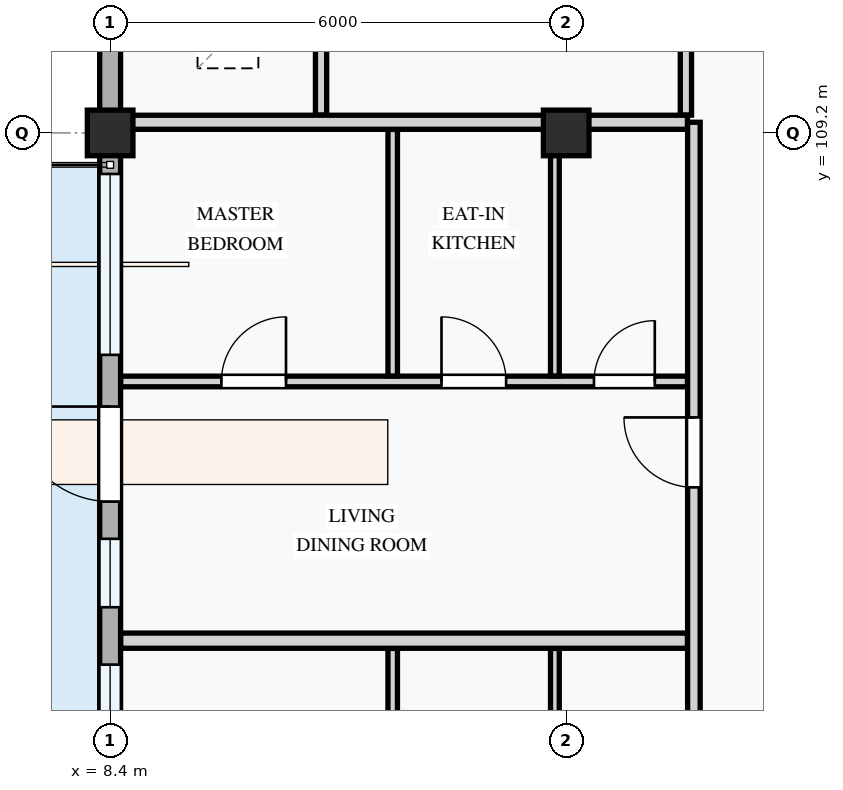
"""IFC4 building model, lengths in metres.
Left out: names, types, materials, properties, quantities, classifications, styles, units other than length and angle.
Written with IfcOpenShell. Run it as: python <this file> out.ifc"""

import sys

from ifc_helpers import new_model, si_unit, direction, frame, frame_2d, origin, origin_2d, place, context, subcontext, project, spatial, rectangle, extrude, element, fill, save


model = new_model("IFC4")
c1 = context("Model", 3, precision=1e-05, world=origin(), true_north=direction((0.0, 1.0)))
c2 = subcontext(c1, "Body", "Model", "MODEL_VIEW")
j1 = project(units=[si_unit("LENGTHUNIT", "METRE"), si_unit("PLANEANGLEUNIT", "RADIAN")], contexts=[c1])
p1 = place(None, origin())
s1 = spatial("IfcSite", under=j1, at=p1, CompositionType="ELEMENT")
p2 = place(p1, origin())
s2 = spatial("IfcBuilding", under=s1, at=p2, CompositionType="ELEMENT")
p3 = place(p2, frame((0.0, 0.0, 31.2)))
s3 = spatial("IfcBuildingStorey", under=s2, at=p3, CompositionType="ELEMENT", Elevation=31.2)
for number, where, z_axis, x_axis in (
    (1, (8.4, 109.2, 0.0), (0.0, 0.0, 1.0), (1.0, 0.0, 0.0)),
    (2, (14.4, 109.2, 0.0), (0.0, 0.0, 1.0), (1.0, 0.0, 0.0)),
):
    element("IfcColumn", number, at=place(p3, frame(where, z_axis=z_axis, x_axis=x_axis)), inside=s3, PredefinedType="COLUMN", context=c2, shape_type="SweptSolid", body=[
        extrude(rectangle(XDim=0.6, YDim=0.6, at=origin_2d()), origin(), (0.0, 0.0, 1.0), 3.3),
    ])
p4 = place(p3, frame((8.4, 115.2, 0.0), z_axis=(0.0, 0.0, 1.0), x_axis=(0.0, -1.0, 0.0)))
e3 = element("IfcWall", 3, at=p4, inside=s3, PredefinedType="STANDARD", context=c2, shape_type="SweptSolid", body=[
    extrude(rectangle(XDim=6.0, YDim=0.275, at=frame_2d((3.0, 0.0))), origin(), (0.0, 0.0, 1.0), 2.575),
])
p5 = place(p4, frame((0.545, 0.0, 0.78)))
e4 = element("IfcOpeningElement", 4, at=p5, cuts=e3, PredefinedType="OPENING", context=c2, shape_type="SweptSolid", body=[
    extrude(rectangle(XDim=0.9, YDim=1.2, at=frame_2d((0.45, 0.6))), frame((0.0, 0.147, 0.0), z_axis=(0.0, -1.0, 0.0), x_axis=(1.0, 0.0, 0.0)), (0.0, 0.0, 1.0), 0.295),
])
p6 = place(p4, frame((2.98, 0.0, 0.78)))
e5 = element("IfcOpeningElement", 5, at=p6, cuts=e3, PredefinedType="OPENING", context=c2, shape_type="SweptSolid", body=[
    extrude(rectangle(XDim=1.65, YDim=1.5, at=frame_2d((0.825, 0.75))), frame((0.0, 0.147, 0.0), z_axis=(0.0, -1.0, 0.0), x_axis=(1.0, 0.0, 0.0)), (0.0, 0.0, 1.0), 0.295),
])
p7 = place(p3, frame((8.4, 109.2, 0.0), z_axis=(0.0, 0.0, 1.0), x_axis=(0.0, -1.0, 0.0)))
e6 = element("IfcWall", 6, at=p7, inside=s3, PredefinedType="STANDARD", context=c2, shape_type="SweptSolid", body=[
    extrude(rectangle(XDim=8.4, YDim=0.275, at=frame_2d((4.2, 0.0))), origin(), (0.0, 0.0, 1.0), 2.425),
])
p8 = place(p7, frame((3.6, 0.0, 0.0)))
e7 = element("IfcOpeningElement", 7, at=p8, cuts=e6, PredefinedType="OPENING", context=c2, shape_type="SweptSolid", body=[
    extrude(rectangle(XDim=1.25, YDim=2.2, at=frame_2d((0.625, 1.1))), frame((0.0, 0.147, 0.0), z_axis=(0.0, -1.0, 0.0), x_axis=(1.0, 0.0, 0.0)), (0.0, 0.0, 1.0), 0.295),
])
p9 = place(p7, frame((0.54, 0.0, 0.78)))
e8 = element("IfcOpeningElement", 8, at=p9, cuts=e6, PredefinedType="OPENING", context=c2, shape_type="SweptSolid", body=[
    extrude(rectangle(XDim=2.38, YDim=1.48, at=frame_2d((1.19, 0.74))), frame((0.0, 0.147, 0.0), z_axis=(0.0, -1.0, 0.0), x_axis=(1.0, 0.0, 0.0)), (0.0, 0.0, 1.0), 0.295),
])
p10 = place(p7, frame((5.34, 0.0, 0.78)))
e9 = element("IfcOpeningElement", 9, at=p10, cuts=e6, PredefinedType="OPENING", context=c2, shape_type="SweptSolid", body=[
    extrude(rectangle(XDim=0.9, YDim=1.2, at=frame_2d((0.45, 0.6))), frame((0.0, 0.147, 0.0), z_axis=(0.0, -1.0, 0.0), x_axis=(1.0, 0.0, 0.0)), (0.0, 0.0, 1.0), 0.295),
])
p11 = place(p7, frame((6.995, 0.0, 0.78)))
e10 = element("IfcOpeningElement", 10, at=p11, cuts=e6, PredefinedType="OPENING", context=c2, shape_type="SweptSolid", body=[
    extrude(rectangle(XDim=0.9, YDim=1.2, at=frame_2d((0.45, 0.6))), frame((0.0, 0.147, 0.0), z_axis=(0.0, -1.0, 0.0), x_axis=(1.0, 0.0, 0.0)), (0.0, 0.0, 1.0), 0.295),
])
for number, where, z_axis, x_axis in (
    (11, (11.175, 113.324, 0.0), (0.0, 0.0, 1.0), (0.0, -1.0, 0.0)),
    (12, (15.975, 113.324, 0.0), (0.0, 0.0, 1.0), (0.0, -1.0, 0.0)),
):
    element("IfcWall", number, at=place(p3, frame(where, z_axis=z_axis, x_axis=x_axis)), inside=s3, PredefinedType="PARTITIONING", context=c2, shape_type="SweptSolid", body=[
        extrude(rectangle(XDim=3.889, YDim=0.148, at=frame_2d((1.945, 0.0))), origin(), (0.0, 0.0, 1.0), 3.0),
    ])
p12 = place(p3, frame((12.118, 97.852, 0.0), z_axis=(0.0, 0.0, 1.0), x_axis=(0.0, 1.0, 0.0)))
e13 = element("IfcWall", 13, at=p12, inside=s3, PredefinedType="PARTITIONING", context=c2, shape_type="SweptSolid", body=[
    extrude(rectangle(XDim=4.566, YDim=0.125, at=frame_2d((2.283, 0.0))), origin(), (0.0, 0.0, 1.0), 3.0),
])
p13 = place(p3, frame((14.251, 97.852, 0.0), z_axis=(0.0, 0.0, 1.0), x_axis=(0.0, 1.0, 0.0)))
e14 = element("IfcWall", 14, at=p13, inside=s3, PredefinedType="PARTITIONING", context=c2, shape_type="SweptSolid", body=[
    extrude(rectangle(XDim=4.566, YDim=0.115, at=frame_2d((2.283, 0.0))), origin(), (0.0, 0.0, 1.0), 2.425),
])
p14 = place(p3, frame((8.54, 105.93, 0.0), z_axis=(0.0, 0.0, 1.0), x_axis=(1.0, 0.0, 0.0)))
e15 = element("IfcWall", 15, at=p14, inside=s3, PredefinedType="PARTITIONING", context=c2, shape_type="SweptSolid", body=[
    extrude(rectangle(XDim=7.456, YDim=0.14, at=frame_2d((3.728, 0.0))), origin(), (0.0, 0.0, 1.0), 3.0),
])
p15 = place(p14, frame((1.324, 0.0, 0.0)))
e16 = element("IfcOpeningElement", 16, at=p15, cuts=e15, PredefinedType="OPENING", context=c2, shape_type="SweptSolid", body=[
    extrude(rectangle(XDim=0.85, YDim=2.1, at=frame_2d((0.425, 1.05))), frame((0.0, 0.08, 0.0), z_axis=(0.0, -1.0, 0.0), x_axis=(1.0, 0.0, 0.0)), (0.0, 0.0, 1.0), 0.16),
])
p16 = place(p14, frame((4.22, 0.0, 0.0)))
e17 = element("IfcOpeningElement", 17, at=p16, cuts=e15, PredefinedType="OPENING", context=c2, shape_type="SweptSolid", body=[
    extrude(rectangle(XDim=0.85, YDim=2.1, at=frame_2d((0.425, 1.05))), frame((0.0, 0.08, 0.0), z_axis=(0.0, -1.0, 0.0), x_axis=(1.0, 0.0, 0.0)), (0.0, 0.0, 1.0), 0.16),
])
p17 = place(p14, frame((6.226, 0.0, 0.0)))
e18 = element("IfcOpeningElement", 18, at=p17, cuts=e15, PredefinedType="OPENING", context=c2, shape_type="SweptSolid", body=[
    extrude(rectangle(XDim=0.8, YDim=2.1, at=frame_2d((0.4, 1.05))), frame((0.0, 0.08, 0.0), z_axis=(0.0, -1.0, 0.0), x_axis=(1.0, 0.0, 0.0)), (0.0, 0.0, 1.0), 0.16),
])
p18 = place(p3, frame((12.118, 106.002, 0.0), z_axis=(0.0, 0.0, 1.0), x_axis=(0.0, 1.0, 0.0)))
e19 = element("IfcWall", 19, at=p18, inside=s3, PredefinedType="PARTITIONING", context=c2, shape_type="SweptSolid", body=[
    extrude(rectangle(XDim=3.244, YDim=0.125, at=frame_2d((1.622, 0.0))), origin(), (0.0, 0.0, 1.0), 3.0),
])
p19 = place(p3, frame((14.251, 106.002, 0.0), z_axis=(0.0, 0.0, 1.0), x_axis=(0.0, 1.0, 0.0)))
e20 = element("IfcWall", 20, at=p19, inside=s3, PredefinedType="PARTITIONING", context=c2, shape_type="SweptSolid", body=[
    extrude(rectangle(XDim=3.244, YDim=0.115, at=frame_2d((1.622, 0.0))), origin(), (0.0, 0.0, 1.0), 2.425),
])
p20 = place(p3, frame((8.54, 102.52, 0.0), z_axis=(0.0, 0.0, 1.0), x_axis=(1.0, 0.0, 0.0)))
e21 = element("IfcWall", 21, at=p20, inside=s3, PredefinedType="PARTITIONING", context=c2, shape_type="SweptSolid", body=[
    extrude(rectangle(XDim=7.456, YDim=0.2, at=frame_2d((3.728, 0.0))), origin(), (0.0, 0.0, 1.0), 3.0),
])
p21 = place(p3, frame((8.54, 109.34, 0.0), z_axis=(0.0, 0.0, 1.0), x_axis=(1.0, 0.0, 0.0)))
e22 = element("IfcWall", 22, at=p21, inside=s3, PredefinedType="PARTITIONING", context=c2, shape_type="SweptSolid", body=[
    extrude(rectangle(XDim=7.456, YDim=0.185, at=frame_2d((3.728, 0.0))), origin(), (0.0, 0.0, 1.0), 2.375),
])
p22 = place(p3, frame((16.08, 86.46, 0.0), z_axis=(0.0, 0.0, 1.0), x_axis=(0.0, 1.0, 0.0)))
e23 = element("IfcWall", 23, at=p22, inside=s3, PredefinedType="PARTITIONING", context=c2, shape_type="SweptSolid", body=[
    extrude(rectangle(XDim=22.88, YDim=0.165, at=frame_2d((11.44, 0.0))), origin(), (0.0, 0.0, 1.0), 3.0),
])
p23 = place(p22, frame((2.08, 0.0, 0.0)))
e24 = element("IfcOpeningElement", 24, at=p23, cuts=e23, PredefinedType="OPENING", context=c2, shape_type="SweptSolid", body=[
    extrude(rectangle(XDim=0.92, YDim=2.1, at=frame_2d((0.46, 1.05))), frame((0.0, 0.093, 0.0), z_axis=(0.0, -1.0, 0.0), x_axis=(1.0, 0.0, 0.0)), (0.0, 0.0, 1.0), 0.185),
])
p24 = place(p22, frame((10.11, 0.0, 0.0)))
e25 = element("IfcOpeningElement", 25, at=p24, cuts=e23, PredefinedType="OPENING", context=c2, shape_type="SweptSolid", body=[
    extrude(rectangle(XDim=0.92, YDim=2.1, at=frame_2d((0.46, 1.05))), frame((0.0, 0.093, 0.0), z_axis=(0.0, -1.0, 0.0), x_axis=(1.0, 0.0, 0.0)), (0.0, 0.0, 1.0), 0.185),
])
p25 = place(p22, frame((18.077, 0.0, 0.0)))
e26 = element("IfcOpeningElement", 26, at=p25, cuts=e23, PredefinedType="OPENING", context=c2, shape_type="SweptSolid", body=[
    extrude(rectangle(XDim=0.92, YDim=2.1, at=frame_2d((0.46, 1.05))), frame((0.0, 0.093, 0.0), z_axis=(0.0, -1.0, 0.0), x_axis=(1.0, 0.0, 0.0)), (0.0, 0.0, 1.0), 0.185),
])
p26 = place(p8, frame((1.25, 0.0, 0.0), z_axis=(0.0, 0.0, 1.0), x_axis=(-1.0, 0.0, 0.0)))
e27 = element("IfcDoor", 27, at=p26, inside=s3, OperationType="SINGLE_SWING_RIGHT", PredefinedType="DOOR", context=c2, shape_type="SweptSolid", body=[
    extrude(rectangle(XDim=1.25, YDim=2.2, at=frame_2d((0.625, 1.1))), frame((0.0, 0.025, 0.0), z_axis=(0.0, -1.0, 0.0), x_axis=(1.0, 0.0, 0.0)), (0.0, 0.0, 1.0), 0.05),
])
fill(e7, e27)
p27 = place(p9, origin())
e28 = element("IfcWindow", 28, at=p27, inside=s3, PartitioningType="DOUBLE_PANEL_VERTICAL", PredefinedType="WINDOW", context=c2, shape_type="SweptSolid", body=[
    extrude(rectangle(XDim=2.38, YDim=1.48, at=frame_2d((1.19, 0.74))), frame((0.0, 0.03, 0.0), z_axis=(0.0, -1.0, 0.0), x_axis=(1.0, 0.0, 0.0)), (0.0, 0.0, 1.0), 0.06),
])
fill(e8, e28)
p28 = place(p10, origin())
e29 = element("IfcWindow", 29, at=p28, inside=s3, PartitioningType="SINGLE_PANEL", PredefinedType="WINDOW", context=c2, shape_type="SweptSolid", body=[
    extrude(rectangle(XDim=0.9, YDim=1.2, at=frame_2d((0.45, 0.6))), frame((0.0, 0.03, 0.0), z_axis=(0.0, -1.0, 0.0), x_axis=(1.0, 0.0, 0.0)), (0.0, 0.0, 1.0), 0.06),
])
fill(e9, e29)
p29 = place(p11, origin())
e30 = element("IfcWindow", 30, at=p29, inside=s3, PartitioningType="SINGLE_PANEL", PredefinedType="WINDOW", context=c2, shape_type="SweptSolid", body=[
    extrude(rectangle(XDim=0.9, YDim=1.2, at=frame_2d((0.45, 0.6))), frame((0.0, 0.03, 0.0), z_axis=(0.0, -1.0, 0.0), x_axis=(1.0, 0.0, 0.0)), (0.0, 0.0, 1.0), 0.06),
])
fill(e10, e30)
p30 = place(p15, origin())
e31 = element("IfcDoor", 31, at=p30, inside=s3, OperationType="SINGLE_SWING_RIGHT", PredefinedType="DOOR", context=c2, shape_type="SweptSolid", body=[
    extrude(rectangle(XDim=0.85, YDim=2.1, at=frame_2d((0.425, 1.05))), frame((0.0, 0.025, 0.0), z_axis=(0.0, -1.0, 0.0), x_axis=(1.0, 0.0, 0.0)), (0.0, 0.0, 1.0), 0.05),
])
fill(e16, e31)
p31 = place(p16, origin())
e32 = element("IfcDoor", 32, at=p31, inside=s3, OperationType="SINGLE_SWING_LEFT", PredefinedType="DOOR", context=c2, shape_type="SweptSolid", body=[
    extrude(rectangle(XDim=0.85, YDim=2.1, at=frame_2d((0.425, 1.05))), frame((0.0, 0.025, 0.0), z_axis=(0.0, -1.0, 0.0), x_axis=(1.0, 0.0, 0.0)), (0.0, 0.0, 1.0), 0.05),
])
fill(e17, e32)
p32 = place(p17, origin())
e33 = element("IfcDoor", 33, at=p32, inside=s3, OperationType="SINGLE_SWING_RIGHT", PredefinedType="DOOR", context=c2, shape_type="SweptSolid", body=[
    extrude(rectangle(XDim=0.8, YDim=2.1, at=frame_2d((0.4, 1.05))), frame((0.0, 0.025, 0.0), z_axis=(0.0, -1.0, 0.0), x_axis=(1.0, 0.0, 0.0)), (0.0, 0.0, 1.0), 0.05),
])
fill(e18, e33)
p33 = place(p25, origin())
e34 = element("IfcDoor", 34, at=p33, inside=s3, OperationType="SINGLE_SWING_RIGHT", PredefinedType="DOOR", context=c2, shape_type="SweptSolid", body=[
    extrude(rectangle(XDim=0.92, YDim=2.1, at=frame_2d((0.46, 1.05))), frame((0.0, 0.025, 0.0), z_axis=(0.0, -1.0, 0.0), x_axis=(1.0, 0.0, 0.0)), (0.0, 0.0, 1.0), 0.05),
])
fill(e26, e34)
save(model, sys.argv[1])
